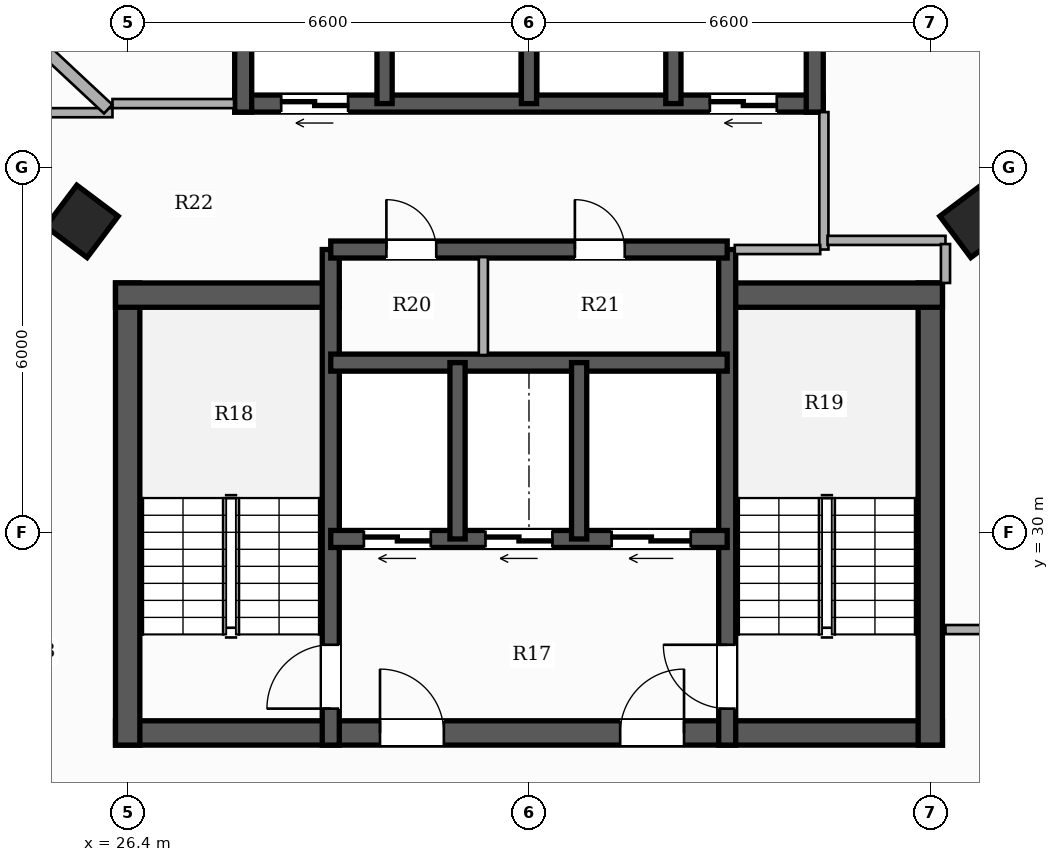
"""IFC4 building model, lengths in metres.
Left out: names, types, materials, properties, quantities, classifications, styles, units other than length and angle.
Written with IfcOpenShell. Run it as: python <this file> out.ifc"""

import sys

from ifc_helpers import new_model, si_unit, direction, frame, frame_2d, origin, origin_2d, place, context, subcontext, project, spatial, rectangle, hollow_rectangle, extrude, element, fill, save


model = new_model("IFC4")
c1 = context("Model", 3, precision=1e-05, world=origin(), true_north=direction((0.0, 1.0)))
c2 = subcontext(c1, "Body", "Model", "MODEL_VIEW")
j1 = project(units=[si_unit("LENGTHUNIT", "METRE"), si_unit("PLANEANGLEUNIT", "RADIAN")], contexts=[c1])
p1 = place(None, origin())
s1 = spatial("IfcSite", under=j1, at=p1, CompositionType="ELEMENT")
p2 = place(p1, origin())
s2 = spatial("IfcBuilding", under=s1, at=p2, CompositionType="ELEMENT")
p3 = place(p2, frame((0.0, 0.0, 143.0)))
s3 = spatial("IfcBuildingStorey", under=s2, at=p3, CompositionType="ELEMENT", Elevation=143.0)
p4 = place(p3, frame((26.2, 26.7, 0.0), z_axis=(0.0, 0.0, 1.0), x_axis=(1.0, 0.0, 0.0)))
e1 = element("IfcWall", 1, at=p4, inside=s3, PredefinedType="SHEAR", context=c2, shape_type="SweptSolid", body=[
    extrude(rectangle(XDim=13.6, YDim=0.4, at=frame_2d((6.8, 0.0))), origin(), (0.0, 0.0, 1.0), 3.3),
])
p5 = place(p4, frame((4.35, 0.0, 0.0)))
e2 = element("IfcOpeningElement", 2, at=p5, cuts=e1, PredefinedType="OPENING", context=c2, shape_type="SweptSolid", body=[
    extrude(rectangle(XDim=1.05, YDim=2.15, at=frame_2d((0.525, 1.075))), frame((0.0, 0.21, 0.0), z_axis=(0.0, -1.0, 0.0), x_axis=(1.0, 0.0, 0.0)), (0.0, 0.0, 1.0), 0.42),
])
p6 = place(p4, frame((8.3, 0.0, 0.0)))
e3 = element("IfcOpeningElement", 3, at=p6, cuts=e1, PredefinedType="OPENING", context=c2, shape_type="SweptSolid", body=[
    extrude(rectangle(XDim=1.05, YDim=2.15, at=frame_2d((0.525, 1.075))), frame((0.0, 0.21, 0.0), z_axis=(0.0, -1.0, 0.0), x_axis=(1.0, 0.0, 0.0)), (0.0, 0.0, 1.0), 0.42),
])
p7 = place(p3, frame((26.4, 26.5, 0.0), z_axis=(0.0, 0.0, 1.0), x_axis=(0.0, 1.0, 0.0)))
e4 = element("IfcWall", 4, at=p7, inside=s3, PredefinedType="SHEAR", context=c2, shape_type="SweptSolid", body=[
    extrude(rectangle(XDim=7.6, YDim=0.4, at=frame_2d((3.8, 0.0))), origin(), (0.0, 0.0, 1.0), 3.3),
])
p8 = place(p3, frame((26.2, 33.9, 0.0), z_axis=(0.0, 0.0, 1.0), x_axis=(1.0, 0.0, 0.0)))
e5 = element("IfcWall", 5, at=p8, inside=s3, PredefinedType="SHEAR", context=c2, shape_type="SweptSolid", body=[
    extrude(rectangle(XDim=3.68, YDim=0.4, at=frame_2d((1.84, 0.0))), origin(), (0.0, 0.0, 1.0), 3.3),
])
p9 = place(p3, frame((39.6, 26.5, 0.0), z_axis=(0.0, 0.0, 1.0), x_axis=(0.0, 1.0, 0.0)))
e6 = element("IfcWall", 6, at=p9, inside=s3, PredefinedType="SHEAR", context=c2, shape_type="SweptSolid", body=[
    extrude(rectangle(XDim=7.6, YDim=0.4, at=frame_2d((3.8, 0.0))), origin(), (0.0, 0.0, 1.0), 3.3),
])
p10 = place(p3, frame((36.12, 33.9, 0.0), z_axis=(0.0, 0.0, 1.0), x_axis=(1.0, 0.0, 0.0)))
e7 = element("IfcWall", 7, at=p10, inside=s3, PredefinedType="SHEAR", context=c2, shape_type="SweptSolid", body=[
    extrude(rectangle(XDim=3.68, YDim=0.4, at=frame_2d((1.84, 0.0))), origin(), (0.0, 0.0, 1.0), 3.3),
])
p11 = place(p3, frame((29.74, 26.5, 0.0), z_axis=(0.0, 0.0, 1.0), x_axis=(0.0, 1.0, 0.0)))
e8 = element("IfcWall", 8, at=p11, inside=s3, PredefinedType="SHEAR", context=c2, shape_type="SweptSolid", body=[
    extrude(rectangle(XDim=8.15, YDim=0.28, at=frame_2d((4.075, 0.0))), origin(), (0.0, 0.0, 1.0), 3.3),
])
p12 = place(p11, frame((0.6, 0.0, 0.0)))
e9 = element("IfcOpeningElement", 9, at=p12, cuts=e8, PredefinedType="OPENING", context=c2, shape_type="SweptSolid", body=[
    extrude(rectangle(XDim=1.05, YDim=2.15, at=frame_2d((0.525, 1.075))), frame((0.0, 0.15, 0.0), z_axis=(0.0, -1.0, 0.0), x_axis=(1.0, 0.0, 0.0)), (0.0, 0.0, 1.0), 0.3),
])
p13 = place(p3, frame((36.26, 26.5, 0.0), z_axis=(0.0, 0.0, 1.0), x_axis=(0.0, 1.0, 0.0)))
e10 = element("IfcWall", 10, at=p13, inside=s3, PredefinedType="SHEAR", context=c2, shape_type="SweptSolid", body=[
    extrude(rectangle(XDim=8.15, YDim=0.28, at=frame_2d((4.075, 0.0))), origin(), (0.0, 0.0, 1.0), 3.3),
])
p14 = place(p13, frame((0.6, 0.0, 0.0)))
e11 = element("IfcOpeningElement", 11, at=p14, cuts=e10, PredefinedType="OPENING", context=c2, shape_type="SweptSolid", body=[
    extrude(rectangle(XDim=1.05, YDim=2.15, at=frame_2d((0.525, 1.075))), frame((0.0, 0.15, 0.0), z_axis=(0.0, -1.0, 0.0), x_axis=(1.0, 0.0, 0.0)), (0.0, 0.0, 1.0), 0.3),
])
p15 = place(p3, frame((36.26, 29.89, 0.0), z_axis=(0.0, 0.0, 1.0), x_axis=(-1.0, 0.0, 0.0)))
e12 = element("IfcWall", 12, at=p15, inside=s3, PredefinedType="SHEAR", context=c2, shape_type="SweptSolid", body=[
    extrude(rectangle(XDim=6.52, YDim=0.28, at=frame_2d((3.26, 0.0))), origin(), (0.0, 0.0, 1.0), 3.3),
])
p16 = place(p15, frame((4.875, 0.0, 0.0)))
e13 = element("IfcOpeningElement", 13, at=p16, cuts=e12, PredefinedType="OPENING", context=c2, shape_type="SweptSolid", body=[
    extrude(rectangle(XDim=1.1, YDim=2.2, at=frame_2d((0.55, 1.1))), frame((0.0, 0.15, 0.0), z_axis=(0.0, -1.0, 0.0), x_axis=(1.0, 0.0, 0.0)), (0.0, 0.0, 1.0), 0.3),
])
p17 = place(p15, frame((2.875, 0.0, 0.0)))
e14 = element("IfcOpeningElement", 14, at=p17, cuts=e12, PredefinedType="OPENING", context=c2, shape_type="SweptSolid", body=[
    extrude(rectangle(XDim=1.1, YDim=2.2, at=frame_2d((0.55, 1.1))), frame((0.0, 0.15, 0.0), z_axis=(0.0, -1.0, 0.0), x_axis=(1.0, 0.0, 0.0)), (0.0, 0.0, 1.0), 0.3),
])
p18 = place(p15, frame((0.6, 0.0, 0.0)))
e15 = element("IfcOpeningElement", 15, at=p18, cuts=e12, PredefinedType="OPENING", context=c2, shape_type="SweptSolid", body=[
    extrude(rectangle(XDim=1.3, YDim=2.2, at=frame_2d((0.65, 1.1))), frame((0.0, 0.15, 0.0), z_axis=(0.0, -1.0, 0.0), x_axis=(1.0, 0.0, 0.0)), (0.0, 0.0, 1.0), 0.3),
])
p19 = place(p3, frame((29.74, 32.79, 0.0), z_axis=(0.0, 0.0, 1.0), x_axis=(1.0, 0.0, 0.0)))
e16 = element("IfcWall", 16, at=p19, inside=s3, PredefinedType="SHEAR", context=c2, shape_type="SweptSolid", body=[
    extrude(rectangle(XDim=6.52, YDim=0.28, at=frame_2d((3.26, 0.0))), origin(), (0.0, 0.0, 1.0), 3.3),
])
for number, where, z_axis, x_axis in (
    (17, (31.825, 29.89, 0.0), (0.0, 0.0, 1.0), (0.0, 1.0, 0.0)),
    (18, (33.825, 29.89, 0.0), (0.0, 0.0, 1.0), (0.0, 1.0, 0.0)),
):
    element("IfcWall", number, at=place(p3, frame(where, z_axis=z_axis, x_axis=x_axis)), inside=s3, PredefinedType="SHEAR", context=c2, shape_type="SweptSolid", body=[
        extrude(rectangle(XDim=2.9, YDim=0.25, at=frame_2d((1.45, 0.0))), origin(), (0.0, 0.0, 1.0), 3.3),
    ])
p20 = place(p3, frame((29.74, 34.65, 0.0), z_axis=(0.0, 0.0, 1.0), x_axis=(1.0, 0.0, 0.0)))
e19 = element("IfcWall", 19, at=p20, inside=s3, PredefinedType="SHEAR", context=c2, shape_type="SweptSolid", body=[
    extrude(rectangle(XDim=6.52, YDim=0.28, at=frame_2d((3.26, 0.0))), origin(), (0.0, 0.0, 1.0), 3.3),
])
p21 = place(p20, frame((0.915, 0.0, 0.0)))
e20 = element("IfcOpeningElement", 20, at=p21, cuts=e19, PredefinedType="OPENING", context=c2, shape_type="SweptSolid", body=[
    extrude(rectangle(XDim=0.82, YDim=2.1, at=frame_2d((0.41, 1.05))), frame((0.0, 0.15, 0.0), z_axis=(0.0, -1.0, 0.0), x_axis=(1.0, 0.0, 0.0)), (0.0, 0.0, 1.0), 0.3),
])
p22 = place(p20, frame((4.015, 0.0, 0.0)))
e21 = element("IfcOpeningElement", 21, at=p22, cuts=e19, PredefinedType="OPENING", context=c2, shape_type="SweptSolid", body=[
    extrude(rectangle(XDim=0.82, YDim=2.1, at=frame_2d((0.41, 1.05))), frame((0.0, 0.15, 0.0), z_axis=(0.0, -1.0, 0.0), x_axis=(1.0, 0.0, 0.0)), (0.0, 0.0, 1.0), 0.3),
])
p23 = place(p3, frame((37.84, 37.05, 0.0), z_axis=(0.0, 0.0, 1.0), x_axis=(-1.0, 0.0, 0.0)))
e22 = element("IfcWall", 22, at=p23, inside=s3, PredefinedType="SHEAR", context=c2, shape_type="SweptSolid", body=[
    extrude(rectangle(XDim=9.68, YDim=0.28, at=frame_2d((4.84, 0.0))), origin(), (0.0, 0.0, 1.0), 3.3),
])
p24 = place(p23, frame((7.815, 0.0, 0.0)))
e23 = element("IfcOpeningElement", 23, at=p24, cuts=e22, PredefinedType="OPENING", context=c2, shape_type="SweptSolid", body=[
    extrude(rectangle(XDim=1.1, YDim=2.2, at=frame_2d((0.55, 1.1))), frame((0.0, 0.15, 0.0), z_axis=(0.0, -1.0, 0.0), x_axis=(1.0, 0.0, 0.0)), (0.0, 0.0, 1.0), 0.3),
])
p25 = place(p23, frame((0.765, 0.0, 0.0)))
e24 = element("IfcOpeningElement", 24, at=p25, cuts=e22, PredefinedType="OPENING", context=c2, shape_type="SweptSolid", body=[
    extrude(rectangle(XDim=1.1, YDim=2.2, at=frame_2d((0.55, 1.1))), frame((0.0, 0.15, 0.0), z_axis=(0.0, -1.0, 0.0), x_axis=(1.0, 0.0, 0.0)), (0.0, 0.0, 1.0), 0.3),
])
for number, where, z_axis, x_axis in (
    (25, (28.3, 36.91, 0.0), (0.0, 0.0, 1.0), (0.0, 1.0, 0.0)),
    (26, (37.7, 36.91, 0.0), (0.0, 0.0, 1.0), (0.0, 1.0, 0.0)),
):
    element("IfcWall", number, at=place(p3, frame(where, z_axis=z_axis, x_axis=x_axis)), inside=s3, PredefinedType="SHEAR", context=c2, shape_type="SweptSolid", body=[
        extrude(rectangle(XDim=2.83, YDim=0.28, at=frame_2d((1.415, 0.0))), origin(), (0.0, 0.0, 1.0), 3.3),
    ])
for number, where, z_axis, x_axis in (
    (27, (30.625, 37.05, 0.0), (0.0, 0.0, 1.0), (0.0, 1.0, 0.0)),
    (28, (33.0, 37.05, 0.0), (0.0, 0.0, 1.0), (0.0, 1.0, 0.0)),
    (29, (35.375, 37.05, 0.0), (0.0, 0.0, 1.0), (0.0, 1.0, 0.0)),
):
    element("IfcWall", number, at=place(p3, frame(where, z_axis=z_axis, x_axis=x_axis)), inside=s3, PredefinedType="SHEAR", context=c2, shape_type="SweptSolid", body=[
        extrude(rectangle(XDim=2.55, YDim=0.25, at=frame_2d((1.275, 0.0))), origin(), (0.0, 0.0, 1.0), 3.3),
    ])
for number, where, z_axis, x_axis in (
    (30, (25.648, 35.113, 0.0), (0.0, 0.0, 1.0), (0.6, 0.8, 0.0)),
    (31, (40.352, 35.113, 0.0), (0.0, 0.0, 1.0), (-0.6, 0.8, 0.0)),
):
    element("IfcColumn", number, at=place(p3, frame(where, z_axis=z_axis, x_axis=x_axis)), inside=s3, PredefinedType="COLUMN", context=c2, shape_type="SweptSolid", body=[
        extrude(hollow_rectangle(XDim=0.85, YDim=0.85, WallThickness=0.028, at=origin_2d()), origin(), (0.0, 0.0, 1.0), 3.3),
    ])
p26 = place(p3, frame((37.85, 34.65, 0.0), z_axis=(0.0, 0.0, 1.0), x_axis=(0.0, 1.0, 0.0)))
e32 = element("IfcWall", 32, at=p26, inside=s3, PredefinedType="PARTITIONING", context=c2, shape_type="SweptSolid", body=[
    extrude(rectangle(XDim=2.26, YDim=0.15, at=frame_2d((1.13, 0.0))), origin(), (0.0, 0.0, 1.0), 3.02),
])
p27 = place(p3, frame((36.385, 34.65, 0.0), z_axis=(0.0, 0.0, 1.0), x_axis=(1.0, 0.0, 0.0)))
e33 = element("IfcWall", 33, at=p27, inside=s3, PredefinedType="PARTITIONING", context=c2, shape_type="SweptSolid", body=[
    extrude(rectangle(XDim=1.405, YDim=0.15, at=frame_2d((0.703, 0.0))), origin(), (0.0, 0.0, 1.0), 2.385),
])
p28 = place(p3, frame((32.25, 32.915, 0.0), z_axis=(0.0, 0.0, 1.0), x_axis=(0.0, 1.0, 0.0)))
e34 = element("IfcWall", 34, at=p28, inside=s3, PredefinedType="PARTITIONING", context=c2, shape_type="SweptSolid", body=[
    extrude(rectangle(XDim=1.61, YDim=0.15, at=frame_2d((0.805, 0.0))), origin(), (0.0, 0.0, 1.0), 3.02),
])
p29 = place(p3, frame((23.56, 36.9, 0.0), z_axis=(0.0, 0.0, 1.0), x_axis=(1.0, 0.0, 0.0)))
e35 = element("IfcWall", 35, at=p29, inside=s3, PredefinedType="PARTITIONING", context=c2, shape_type="SweptSolid", body=[
    extrude(rectangle(XDim=2.59, YDim=0.15, at=frame_2d((1.295, 0.0))), origin(), (0.0, 0.0, 1.0), 2.373),
])
p30 = place(p3, frame((39.85, 28.4, 0.0), z_axis=(0.0, 0.0, 1.0), x_axis=(1.0, 0.0, 0.0)))
e36 = element("IfcWall", 36, at=p30, inside=s3, PredefinedType="PARTITIONING", context=c2, shape_type="SweptSolid", body=[
    extrude(rectangle(XDim=2.5, YDim=0.15, at=frame_2d((1.25, 0.0))), origin(), (0.0, 0.0, 1.0), 2.681),
])
p31 = place(p3, frame((26.15, 37.05, 0.0), z_axis=(0.0, 0.0, 1.0), x_axis=(1.0, 0.0, 0.0)))
e37 = element("IfcWall", 37, at=p31, inside=s3, PredefinedType="PARTITIONING", context=c2, shape_type="SweptSolid", body=[
    extrude(rectangle(XDim=2.0, YDim=0.15, at=frame_2d((1.0, 0.0))), origin(), (0.0, 0.0, 1.0), 2.373),
])
p32 = place(p3, frame((37.91, 34.8, 0.0), z_axis=(0.0, 0.0, 1.0), x_axis=(1.0, 0.0, 0.0)))
e38 = element("IfcWall", 38, at=p32, inside=s3, PredefinedType="PARTITIONING", context=c2, shape_type="SweptSolid", body=[
    extrude(rectangle(XDim=1.94, YDim=0.15, at=frame_2d((0.97, 0.0))), origin(), (0.0, 0.0, 1.0), 2.681),
])
p33 = place(p3, frame((39.85, 34.74, 0.0), z_axis=(0.0, 0.0, 1.0), x_axis=(0.0, -1.0, 0.0)))
e39 = element("IfcWall", 39, at=p33, inside=s3, PredefinedType="PARTITIONING", context=c2, shape_type="SweptSolid", body=[
    extrude(rectangle(XDim=0.64, YDim=0.15, at=frame_2d((0.32, 0.0))), origin(), (0.0, 0.0, 1.0), 2.681),
])
p34 = place(p3, frame((26.079, 36.96, 0.0), z_axis=(0.0, 0.0, 1.0), x_axis=(-0.730912649308, 0.682471024354, 0.0)))
e40 = element("IfcWall", 40, at=p34, inside=s3, PredefinedType="PARTITIONING", context=c2, shape_type="SweptSolid", body=[
    extrude(rectangle(XDim=3.074, YDim=0.2, at=frame_2d((1.537, 0.0))), origin(), (0.0, 0.0, 1.0), 2.373),
])
p35 = place(p12, origin())
e41 = element("IfcDoor", 41, at=p35, inside=s3, OperationType="SINGLE_SWING_LEFT", PredefinedType="DOOR", context=c2, shape_type="SweptSolid", body=[
    extrude(rectangle(XDim=1.05, YDim=2.15, at=frame_2d((0.525, 1.075))), frame((0.0, 0.025, 0.0), z_axis=(0.0, -1.0, 0.0), x_axis=(1.0, 0.0, 0.0)), (0.0, 0.0, 1.0), 0.05),
])
fill(e9, e41)
p36 = place(p14, origin())
e42 = element("IfcDoor", 42, at=p36, inside=s3, OperationType="SINGLE_SWING_RIGHT", PredefinedType="DOOR", context=c2, shape_type="SweptSolid", body=[
    extrude(rectangle(XDim=1.05, YDim=2.15, at=frame_2d((0.525, 1.075))), frame((0.0, 0.025, 0.0), z_axis=(0.0, -1.0, 0.0), x_axis=(1.0, 0.0, 0.0)), (0.0, 0.0, 1.0), 0.05),
])
fill(e11, e42)
p37 = place(p5, origin())
e43 = element("IfcDoor", 43, at=p37, inside=s3, OperationType="SINGLE_SWING_LEFT", PredefinedType="DOOR", context=c2, shape_type="SweptSolid", body=[
    extrude(rectangle(XDim=1.05, YDim=2.15, at=frame_2d((0.525, 1.075))), frame((0.0, 0.025, 0.0), z_axis=(0.0, -1.0, 0.0), x_axis=(1.0, 0.0, 0.0)), (0.0, 0.0, 1.0), 0.05),
])
fill(e2, e43)
p38 = place(p6, origin())
e44 = element("IfcDoor", 44, at=p38, inside=s3, OperationType="SINGLE_SWING_RIGHT", PredefinedType="DOOR", context=c2, shape_type="SweptSolid", body=[
    extrude(rectangle(XDim=1.05, YDim=2.15, at=frame_2d((0.525, 1.075))), frame((0.0, 0.025, 0.0), z_axis=(0.0, -1.0, 0.0), x_axis=(1.0, 0.0, 0.0)), (0.0, 0.0, 1.0), 0.05),
])
fill(e3, e44)
p39 = place(p16, origin())
e45 = element("IfcDoor", 45, at=p39, inside=s3, OperationType="DOUBLE_DOOR_SLIDING", PredefinedType="DOOR", context=c2, shape_type="SweptSolid", body=[
    extrude(rectangle(XDim=1.1, YDim=2.2, at=frame_2d((0.55, 1.1))), frame((0.0, 0.025, 0.0), z_axis=(0.0, -1.0, 0.0), x_axis=(1.0, 0.0, 0.0)), (0.0, 0.0, 1.0), 0.05),
])
fill(e13, e45)
p40 = place(p17, origin())
e46 = element("IfcDoor", 46, at=p40, inside=s3, OperationType="DOUBLE_DOOR_SLIDING", PredefinedType="DOOR", context=c2, shape_type="SweptSolid", body=[
    extrude(rectangle(XDim=1.1, YDim=2.2, at=frame_2d((0.55, 1.1))), frame((0.0, 0.025, 0.0), z_axis=(0.0, -1.0, 0.0), x_axis=(1.0, 0.0, 0.0)), (0.0, 0.0, 1.0), 0.05),
])
fill(e14, e46)
p41 = place(p18, origin())
e47 = element("IfcDoor", 47, at=p41, inside=s3, OperationType="DOUBLE_DOOR_SLIDING", PredefinedType="DOOR", context=c2, shape_type="SweptSolid", body=[
    extrude(rectangle(XDim=1.3, YDim=2.2, at=frame_2d((0.65, 1.1))), frame((0.0, 0.025, 0.0), z_axis=(0.0, -1.0, 0.0), x_axis=(1.0, 0.0, 0.0)), (0.0, 0.0, 1.0), 0.05),
])
fill(e15, e47)
p42 = place(p24, origin())
e48 = element("IfcDoor", 48, at=p42, inside=s3, OperationType="DOUBLE_DOOR_SLIDING", PredefinedType="DOOR", context=c2, shape_type="SweptSolid", body=[
    extrude(rectangle(XDim=1.1, YDim=2.2, at=frame_2d((0.55, 1.1))), frame((0.0, 0.025, 0.0), z_axis=(0.0, -1.0, 0.0), x_axis=(1.0, 0.0, 0.0)), (0.0, 0.0, 1.0), 0.05),
])
fill(e23, e48)
p43 = place(p25, origin())
e49 = element("IfcDoor", 49, at=p43, inside=s3, OperationType="DOUBLE_DOOR_SLIDING", PredefinedType="DOOR", context=c2, shape_type="SweptSolid", body=[
    extrude(rectangle(XDim=1.1, YDim=2.2, at=frame_2d((0.55, 1.1))), frame((0.0, 0.025, 0.0), z_axis=(0.0, -1.0, 0.0), x_axis=(1.0, 0.0, 0.0)), (0.0, 0.0, 1.0), 0.05),
])
fill(e24, e49)
p44 = place(p21, origin())
e50 = element("IfcDoor", 50, at=p44, inside=s3, OperationType="SINGLE_SWING_LEFT", PredefinedType="DOOR", context=c2, shape_type="SweptSolid", body=[
    extrude(rectangle(XDim=0.82, YDim=2.1, at=frame_2d((0.41, 1.05))), frame((0.0, 0.025, 0.0), z_axis=(0.0, -1.0, 0.0), x_axis=(1.0, 0.0, 0.0)), (0.0, 0.0, 1.0), 0.05),
])
fill(e20, e50)
p45 = place(p22, origin())
e51 = element("IfcDoor", 51, at=p45, inside=s3, OperationType="SINGLE_SWING_LEFT", PredefinedType="DOOR", context=c2, shape_type="SweptSolid", body=[
    extrude(rectangle(XDim=0.82, YDim=2.1, at=frame_2d((0.41, 1.05))), frame((0.0, 0.025, 0.0), z_axis=(0.0, -1.0, 0.0), x_axis=(1.0, 0.0, 0.0)), (0.0, 0.0, 1.0), 0.05),
])
fill(e21, e51)
save(model, sys.argv[1])
